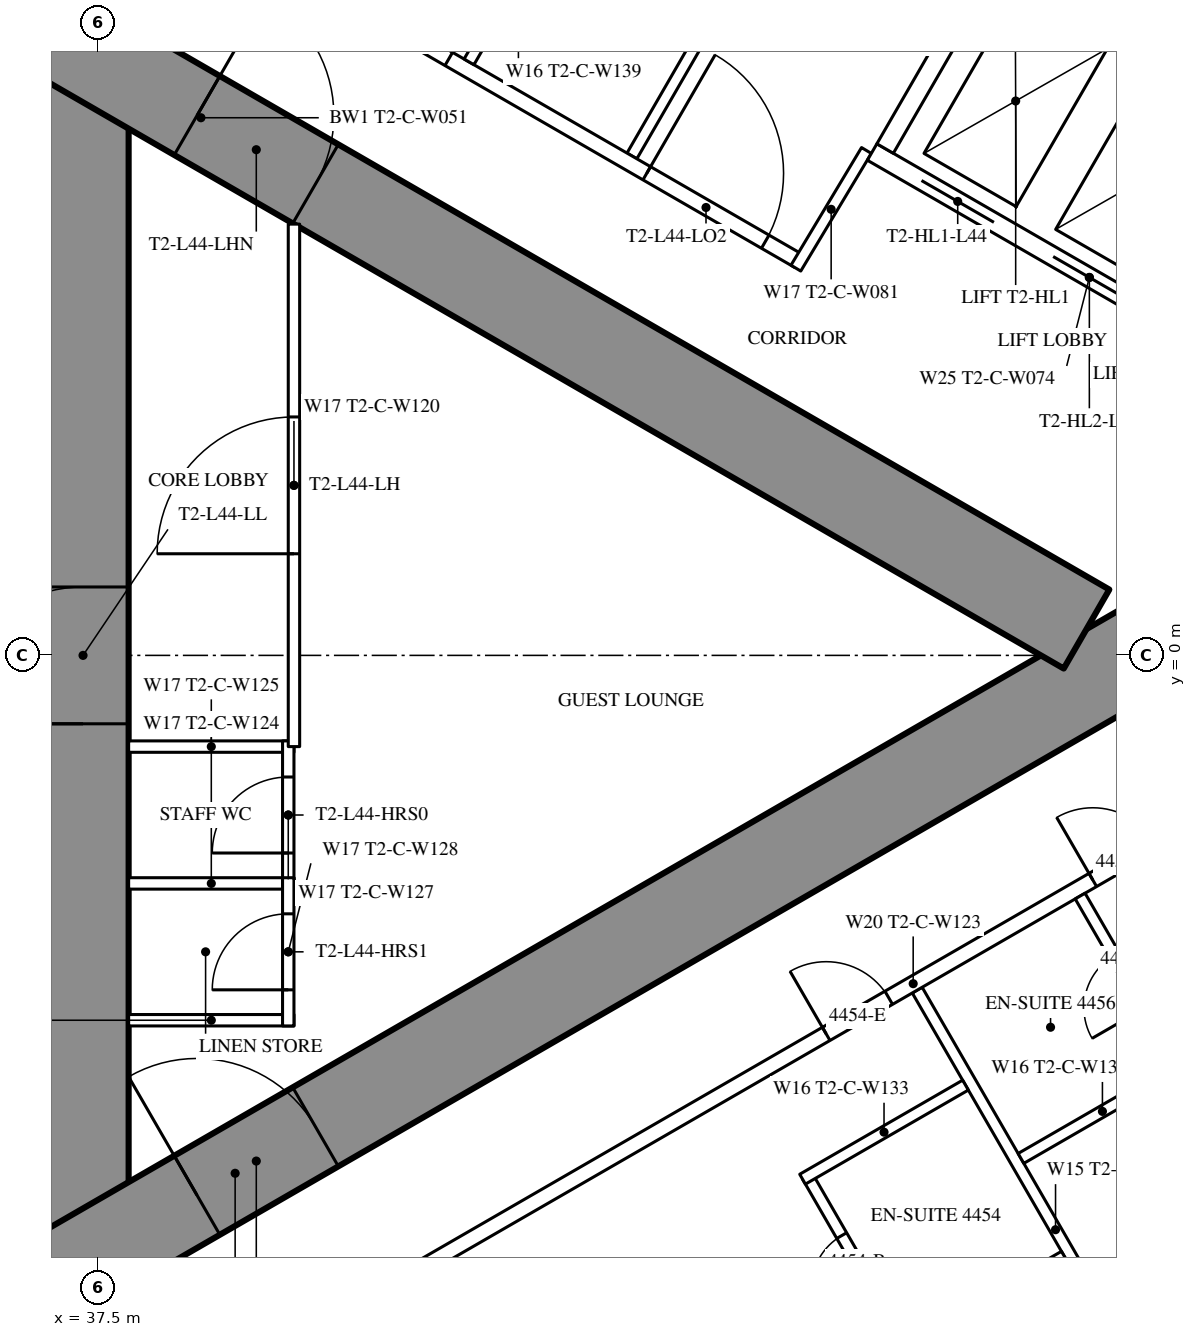
"""IFC4 building model, lengths in metres.
Left out: names, types, materials, properties, quantities, classifications, styles, units other than length and angle.
Written with IfcOpenShell. Run it as: python <this file> out.ifc"""

import sys

from ifc_helpers import new_model, si_unit, direction, frame, frame_2d, origin, place, context, subcontext, project, spatial, rectangle, extrude, element, fill, save


model = new_model("IFC4")
c1 = context("Model", 3, precision=1e-05, world=origin(), true_north=direction((0.0, 1.0)))
c2 = subcontext(c1, "Body", "Model", "MODEL_VIEW")
j1 = project(units=[si_unit("LENGTHUNIT", "METRE"), si_unit("PLANEANGLEUNIT", "RADIAN")], contexts=[c1])
p1 = place(None, origin())
s1 = spatial("IfcSite", under=j1, at=p1, CompositionType="ELEMENT")
p2 = place(p1, origin())
s2 = spatial("IfcBuilding", under=s1, at=p2, CompositionType="ELEMENT")
p3 = place(p2, frame((0.0, 0.0, 166.8)))
s3 = spatial("IfcBuildingStorey", under=s2, at=p3, CompositionType="ELEMENT", Elevation=166.8)
p4 = place(p3, frame((37.3, -8.6, 0.0), z_axis=(0.0, 0.0, 1.0), x_axis=(0.0, 1.0, 0.0)))
e1 = element("IfcWall", 1, at=p4, inside=s3, PredefinedType="SHEAR", context=c2, shape_type="SweptSolid", body=[
    extrude(rectangle(XDim=17.2, YDim=1.2, at=frame_2d((8.6, 0.0))), origin(), (0.0, 0.0, 1.0), 3.5),
])
p5 = place(p4, frame((7.7, 0.0, 0.0)))
e2 = element("IfcOpeningElement", 2, at=p5, cuts=e1, PredefinedType="OPENING", context=c2, shape_type="SweptSolid", body=[
    extrude(rectangle(XDim=1.8, YDim=2.2, at=frame_2d((0.9, 1.1))), frame((0.0, 0.61, 0.0), z_axis=(0.0, -1.0, 0.0), x_axis=(1.0, 0.0, 0.0)), (0.0, 0.0, 1.0), 1.22),
])
p6 = place(p3, frame((27.2, -13.8, 0.0), z_axis=(0.0, 0.0, 1.0), x_axis=(0.866027159892, 0.499996958321, 0.0)))
e3 = element("IfcWall", 3, at=p6, inside=s3, PredefinedType="SHEAR", context=c2, shape_type="SweptSolid", body=[
    extrude(rectangle(XDim=27.947, YDim=1.2, at=frame_2d((13.973, 0.0))), origin(), (0.0, 0.0, 1.0), 3.5),
])
p7 = place(p6, frame((4.6, 0.0, 0.0)))
e4 = element("IfcOpeningElement", 4, at=p7, cuts=e3, PredefinedType="OPENING", context=c2, shape_type="SweptSolid", body=[
    extrude(rectangle(XDim=1.0, YDim=2.2, at=frame_2d((0.5, 1.1))), frame((0.0, 0.61, 0.0), z_axis=(0.0, -1.0, 0.0), x_axis=(1.0, 0.0, 0.0)), (0.0, 0.0, 1.0), 1.22),
])
p8 = place(p6, frame((13.395, 0.0, 0.0)))
e5 = element("IfcOpeningElement", 5, at=p8, cuts=e3, PredefinedType="OPENING", context=c2, shape_type="SweptSolid", body=[
    extrude(rectangle(XDim=1.8, YDim=2.2, at=frame_2d((0.9, 1.1))), frame((0.0, 0.61, 0.0), z_axis=(0.0, -1.0, 0.0), x_axis=(1.0, 0.0, 0.0)), (0.0, 0.0, 1.0), 1.22),
])
p9 = place(p3, frame((27.2, 13.8, 0.0), z_axis=(0.0, 0.0, 1.0), x_axis=(0.866024515034, -0.500001539357, 0.0)))
e6 = element("IfcWall", 6, at=p9, inside=s3, PredefinedType="SHEAR", context=c2, shape_type="SweptSolid", body=[
    extrude(rectangle(XDim=26.907, YDim=1.2, at=frame_2d((13.454, 0.0))), origin(), (0.0, 0.0, 1.0), 3.5),
])
p10 = place(p9, frame((4.6, 0.0, 0.0)))
e7 = element("IfcOpeningElement", 7, at=p10, cuts=e6, PredefinedType="OPENING", context=c2, shape_type="SweptSolid", body=[
    extrude(rectangle(XDim=1.0, YDim=2.2, at=frame_2d((0.5, 1.1))), frame((0.0, 0.61, 0.0), z_axis=(0.0, -1.0, 0.0), x_axis=(1.0, 0.0, 0.0)), (0.0, 0.0, 1.0), 1.22),
])
p11 = place(p9, frame((13.395, 0.0, 0.0)))
e8 = element("IfcOpeningElement", 8, at=p11, cuts=e6, PredefinedType="OPENING", context=c2, shape_type="SweptSolid", body=[
    extrude(rectangle(XDim=1.8, YDim=2.2, at=frame_2d((0.9, 1.1))), frame((0.0, 0.61, 0.0), z_axis=(0.0, -1.0, 0.0), x_axis=(1.0, 0.0, 0.0)), (0.0, 0.0, 1.0), 1.22),
])
p12 = place(p3, frame((48.275, -4.404, 0.0), z_axis=(0.0, 0.0, 1.0), x_axis=(0.500006004368, -0.866021937133, 0.0)))
e9 = element("IfcWall", 9, at=p12, inside=s3, PredefinedType="PARTITIONING", context=c2, shape_type="SweptSolid", body=[
    extrude(rectangle(XDim=7.279, YDim=0.15, at=frame_2d((3.64, 0.0))), origin(), (0.0, 0.0, 1.0), 2.3),
])
p13 = place(p3, frame((44.521, 6.571, 0.0), z_axis=(0.0, 0.0, 1.0), x_axis=(0.500020376429, 0.866013639128, 0.0)))
e10 = element("IfcWall", 10, at=p13, inside=s3, PredefinedType="PARTITIONING", context=c2, shape_type="SweptSolid", body=[
    extrude(rectangle(XDim=7.306, YDim=0.15, at=frame_2d((3.653, 0.0))), origin(), (0.0, 0.0, 1.0), 2.3),
])
p14 = place(p3, frame((27.959, 16.017, 0.0), z_axis=(0.0, 0.0, 1.0), x_axis=(0.866027146794, -0.499996981007, 0.0)))
e11 = element("IfcWall", 11, at=p14, inside=s3, PredefinedType="PARTITIONING", context=c2, shape_type="SweptSolid", body=[
    extrude(rectangle(XDim=21.657, YDim=0.2, at=frame_2d((10.829, 0.0))), origin(), (0.0, 0.0, 1.0), 3.25),
])
p15 = place(p14, frame((15.391, 0.0, 0.0)))
e12 = element("IfcOpeningElement", 12, at=p15, cuts=e11, PredefinedType="OPENING", context=c2, shape_type="SweptSolid", body=[
    extrude(rectangle(XDim=0.95, YDim=2.2, at=frame_2d((0.475, 1.1))), frame((0.0, 0.11, 0.0), z_axis=(0.0, -1.0, 0.0), x_axis=(1.0, 0.0, 0.0)), (0.0, 0.0, 1.0), 0.22),
])
p16 = place(p14, frame((13.409, 0.0, 0.0)))
e13 = element("IfcOpeningElement", 13, at=p16, cuts=e11, PredefinedType="OPENING", context=c2, shape_type="SweptSolid", body=[
    extrude(rectangle(XDim=0.95, YDim=2.2, at=frame_2d((0.475, 1.1))), frame((0.0, 0.11, 0.0), z_axis=(0.0, -1.0, 0.0), x_axis=(1.0, 0.0, 0.0)), (0.0, 0.0, 1.0), 0.22),
])
p17 = place(p14, frame((0.6, 0.0, 0.0)))
e14 = element("IfcOpeningElement", 14, at=p17, cuts=e11, PredefinedType="OPENING", context=c2, shape_type="SweptSolid", body=[
    extrude(rectangle(XDim=0.95, YDim=2.2, at=frame_2d((0.475, 1.1))), frame((0.0, 0.11, 0.0), z_axis=(0.0, -1.0, 0.0), x_axis=(1.0, 0.0, 0.0)), (0.0, 0.0, 1.0), 0.22),
])
p18 = place(p14, frame((19.349, 0.0, 0.0)))
e15 = element("IfcOpeningElement", 15, at=p18, cuts=e11, PredefinedType="OPENING", context=c2, shape_type="SweptSolid", body=[
    extrude(rectangle(XDim=1.8, YDim=2.2, at=frame_2d((0.9, 1.1))), frame((0.0, 0.11, 0.0), z_axis=(0.0, -1.0, 0.0), x_axis=(1.0, 0.0, 0.0)), (0.0, 0.0, 1.0), 0.22),
])
p19 = place(p3, frame((47.606, 6.643, 0.0), z_axis=(0.0, 0.0, 1.0), x_axis=(-0.514237157483, -0.857648031458, 0.0)))
e16 = element("IfcWall", 16, at=p19, inside=s3, PredefinedType="PARTITIONING", context=c2, shape_type="SweptSolid", body=[
    extrude(rectangle(XDim=1.805, YDim=0.15, at=frame_2d((0.902, 0.0))), origin(), (0.0, 0.0, 1.0), 3.25),
])
p20 = place(p3, frame((40.741, -8.638, 0.0), z_axis=(0.0, 0.0, 1.0), x_axis=(0.866022967338, 0.500004220025, 0.0)))
e17 = element("IfcWall", 17, at=p20, inside=s3, PredefinedType="PARTITIONING", context=c2, shape_type="SweptSolid", body=[
    extrude(rectangle(XDim=17.276, YDim=0.2, at=frame_2d((8.638, 0.0))), origin(), (0.0, 0.0, 1.0), 3.25),
])
p21 = place(p20, frame((7.316, 0.0, 0.0)))
e18 = element("IfcOpeningElement", 18, at=p21, cuts=e17, PredefinedType="OPENING", context=c2, shape_type="SweptSolid", body=[
    extrude(rectangle(XDim=0.95, YDim=2.2, at=frame_2d((0.475, 1.1))), frame((0.0, 0.11, 0.0), z_axis=(0.0, -1.0, 0.0), x_axis=(1.0, 0.0, 0.0)), (0.0, 0.0, 1.0), 0.22),
])
p22 = place(p20, frame((11.366, 0.0, 0.0)))
e19 = element("IfcOpeningElement", 19, at=p22, cuts=e17, PredefinedType="OPENING", context=c2, shape_type="SweptSolid", body=[
    extrude(rectangle(XDim=0.95, YDim=2.2, at=frame_2d((0.475, 1.1))), frame((0.0, 0.11, 0.0), z_axis=(0.0, -1.0, 0.0), x_axis=(1.0, 0.0, 0.0)), (0.0, 0.0, 1.0), 0.22),
])
p23 = place(p20, frame((13.347, 0.0, 0.0)))
e20 = element("IfcOpeningElement", 20, at=p23, cuts=e17, PredefinedType="OPENING", context=c2, shape_type="SweptSolid", body=[
    extrude(rectangle(XDim=0.95, YDim=2.2, at=frame_2d((0.475, 1.1))), frame((0.0, 0.11, 0.0), z_axis=(0.0, -1.0, 0.0), x_axis=(1.0, 0.0, 0.0)), (0.0, 0.0, 1.0), 0.22),
])
p24 = place(p3, frame((48.066, -9.143, 0.0), z_axis=(0.0, 0.0, 1.0), x_axis=(0.866006523861, 0.500032699561, 0.0)))
e21 = element("IfcWall", 21, at=p24, inside=s3, PredefinedType="PARTITIONING", context=c2, shape_type="SweptSolid", body=[
    extrude(rectangle(XDim=2.475, YDim=0.15, at=frame_2d((1.237, 0.0))), origin(), (0.0, 0.0, 1.0), 3.25),
])
p25 = place(p3, frame((46.831, -6.854, 0.0), z_axis=(0.0, 0.0, 1.0), x_axis=(0.500006934395, -0.866021400173, 0.0)))
e22 = element("IfcWall", 22, at=p25, inside=s3, PredefinedType="PARTITIONING", context=c2, shape_type="SweptSolid", body=[
    extrude(rectangle(XDim=2.6, YDim=0.15, at=frame_2d((1.3, 0.0))), origin(), (0.0, 0.0, 1.0), 3.25),
])
p26 = place(p25, frame((0.9, 0.0, 0.0)))
e23 = element("IfcOpeningElement", 23, at=p26, cuts=e22, PredefinedType="OPENING", context=c2, shape_type="SweptSolid", body=[
    extrude(rectangle(XDim=0.8, YDim=2.2, at=frame_2d((0.4, 1.1))), frame((0.0, 0.085, 0.0), z_axis=(0.0, -1.0, 0.0), x_axis=(1.0, 0.0, 0.0)), (0.0, 0.0, 1.0), 0.17),
])
for number, where, z_axis, x_axis in (
    (24, (46.766, -6.891, 0.0), (0.0, 0.0, 1.0), (0.866, 0.5, 0.0)),
    (25, (49.64, -6.618, 0.0), (0.0, 0.0, 1.0), (0.866, 0.5, 0.0)),
):
    element("IfcWall", number, at=place(p3, frame(where, z_axis=z_axis, x_axis=x_axis)), inside=s3, PredefinedType="PARTITIONING", context=c2, shape_type="SweptSolid", body=[
        extrude(rectangle(XDim=2.475, YDim=0.15, at=frame_2d((1.237, 0.0))), origin(), (0.0, 0.0, 1.0), 3.25),
    ])
p27 = place(p3, frame((50.418, -3.166, 0.0), z_axis=(0.0, 0.0, 1.0), x_axis=(0.499936506574, -0.866062058628, 0.0)))
e26 = element("IfcWall", 26, at=p27, inside=s3, PredefinedType="PARTITIONING", context=c2, shape_type="SweptSolid", body=[
    extrude(rectangle(XDim=2.6, YDim=0.15, at=frame_2d((1.3, 0.0))), origin(), (0.0, 0.0, 1.0), 3.25),
])
p28 = place(p27, frame((0.9, 0.0, 0.0)))
e27 = element("IfcOpeningElement", 27, at=p28, cuts=e26, PredefinedType="OPENING", context=c2, shape_type="SweptSolid", body=[
    extrude(rectangle(XDim=0.8, YDim=2.2, at=frame_2d((0.4, 1.1))), frame((0.0, 0.085, 0.0), z_axis=(0.0, -1.0, 0.0), x_axis=(1.0, 0.0, 0.0)), (0.0, 0.0, 1.0), 0.17),
])
p29 = place(p3, frame((42.378, 7.808, 0.0), z_axis=(0.0, 0.0, 1.0), x_axis=(0.500006934395, 0.866021400173, 0.0)))
e28 = element("IfcWall", 28, at=p29, inside=s3, PredefinedType="PARTITIONING", context=c2, shape_type="SweptSolid", body=[
    extrude(rectangle(XDim=2.6, YDim=0.15, at=frame_2d((1.3, 0.0))), origin(), (0.0, 0.0, 1.0), 3.25),
])
p30 = place(p29, frame((0.9, 0.0, 0.0)))
e29 = element("IfcOpeningElement", 29, at=p30, cuts=e28, PredefinedType="OPENING", context=c2, shape_type="SweptSolid", body=[
    extrude(rectangle(XDim=0.8, YDim=2.2, at=frame_2d((0.4, 1.1))), frame((0.0, 0.085, 0.0), z_axis=(0.0, -1.0, 0.0), x_axis=(1.0, 0.0, 0.0)), (0.0, 0.0, 1.0), 0.17),
])
for number, where, z_axis, x_axis in (
    (30, (37.9, -1.2, 0.0), (0.0, 0.0, 1.0), (1.0, 0.0, 0.0)),
    (31, (37.9, -3.0, 0.0), (0.0, 0.0, 1.0), (1.0, 0.0, 0.0)),
    (32, (37.9, -4.8, 0.0), (0.0, 0.0, 1.0), (1.0, 0.0, 0.0)),
):
    element("IfcWall", number, at=place(p3, frame(where, z_axis=z_axis, x_axis=x_axis)), inside=s3, PredefinedType="PARTITIONING", context=c2, shape_type="SweptSolid", body=[
        extrude(rectangle(XDim=2.175, YDim=0.15, at=frame_2d((1.087, 0.0))), origin(), (0.0, 0.0, 1.0), 3.25),
    ])
p31 = place(p3, frame((40.0, -3.075, 0.0), z_axis=(0.0, 0.0, 1.0), x_axis=(0.0, 1.0, 0.0)))
e33 = element("IfcWall", 33, at=p31, inside=s3, PredefinedType="PARTITIONING", context=c2, shape_type="SweptSolid", body=[
    extrude(rectangle(XDim=1.95, YDim=0.15, at=frame_2d((0.975, 0.0))), origin(), (0.0, 0.0, 1.0), 3.25),
])
p32 = place(p31, frame((0.475, 0.0, 0.0)))
e34 = element("IfcOpeningElement", 34, at=p32, cuts=e33, PredefinedType="OPENING", context=c2, shape_type="SweptSolid", body=[
    extrude(rectangle(XDim=1.0, YDim=2.2, at=frame_2d((0.5, 1.1))), frame((0.0, 0.085, 0.0), z_axis=(0.0, -1.0, 0.0), x_axis=(1.0, 0.0, 0.0)), (0.0, 0.0, 1.0), 0.17),
])
p33 = place(p3, frame((40.0, -4.875, 0.0), z_axis=(0.0, 0.0, 1.0), x_axis=(0.0, 1.0, 0.0)))
e35 = element("IfcWall", 35, at=p33, inside=s3, PredefinedType="PARTITIONING", context=c2, shape_type="SweptSolid", body=[
    extrude(rectangle(XDim=1.95, YDim=0.15, at=frame_2d((0.975, 0.0))), origin(), (0.0, 0.0, 1.0), 3.25),
])
p34 = place(p33, frame((0.475, 0.0, 0.0)))
e36 = element("IfcOpeningElement", 36, at=p34, cuts=e35, PredefinedType="OPENING", context=c2, shape_type="SweptSolid", body=[
    extrude(rectangle(XDim=1.0, YDim=2.2, at=frame_2d((0.5, 1.1))), frame((0.0, 0.085, 0.0), z_axis=(0.0, -1.0, 0.0), x_axis=(1.0, 0.0, 0.0)), (0.0, 0.0, 1.0), 0.17),
])
p35 = place(p3, frame((40.075, -1.2, 0.0), z_axis=(0.0, 0.0, 1.0), x_axis=(0.0, 1.0, 0.0)))
e37 = element("IfcWall", 37, at=p35, inside=s3, PredefinedType="PARTITIONING", context=c2, shape_type="SweptSolid", body=[
    extrude(rectangle(XDim=6.874, YDim=0.15, at=frame_2d((3.437, 0.0))), origin(), (0.0, 0.0, 1.0), 3.25),
])
p36 = place(p35, frame((2.537, 0.0, 0.0)))
e38 = element("IfcOpeningElement", 38, at=p36, cuts=e37, PredefinedType="OPENING", context=c2, shape_type="SweptSolid", body=[
    extrude(rectangle(XDim=1.8, YDim=2.2, at=frame_2d((0.9, 1.1))), frame((0.0, 0.085, 0.0), z_axis=(0.0, -1.0, 0.0), x_axis=(1.0, 0.0, 0.0)), (0.0, 0.0, 1.0), 0.17),
])
p37 = place(p3, frame((47.681, 6.622, 0.0), z_axis=(0.0, 0.0, 1.0), x_axis=(0.86603344179, -0.499986077507, 0.0)))
e39 = element("IfcWall", 39, at=p37, inside=s3, PredefinedType="PARTITIONING", context=c2, shape_type="SweptSolid", body=[
    extrude(rectangle(XDim=6.6, YDim=0.25, at=frame_2d((3.3, 0.0))), origin(), (0.0, 0.0, 1.0), 3.25),
])
p38 = place(p37, frame((0.75, 0.0, 0.0)))
e40 = element("IfcOpeningElement", 40, at=p38, cuts=e39, PredefinedType="OPENING", context=c2, shape_type="SweptSolid", body=[
    extrude(rectangle(XDim=1.1, YDim=2.2, at=frame_2d((0.55, 1.1))), frame((0.0, 0.135, 0.0), z_axis=(0.0, -1.0, 0.0), x_axis=(1.0, 0.0, 0.0)), (0.0, 0.0, 1.0), 0.27),
])
p39 = place(p37, frame((2.75, 0.0, 0.0)))
e41 = element("IfcOpeningElement", 41, at=p39, cuts=e39, PredefinedType="OPENING", context=c2, shape_type="SweptSolid", body=[
    extrude(rectangle(XDim=1.1, YDim=2.2, at=frame_2d((0.55, 1.1))), frame((0.0, 0.135, 0.0), z_axis=(0.0, -1.0, 0.0), x_axis=(1.0, 0.0, 0.0)), (0.0, 0.0, 1.0), 0.27),
])
p40 = place(p37, frame((4.75, 0.0, 0.0)))
e42 = element("IfcOpeningElement", 42, at=p40, cuts=e39, PredefinedType="OPENING", context=c2, shape_type="SweptSolid", body=[
    extrude(rectangle(XDim=1.1, YDim=2.2, at=frame_2d((0.55, 1.1))), frame((0.0, 0.135, 0.0), z_axis=(0.0, -1.0, 0.0), x_axis=(1.0, 0.0, 0.0)), (0.0, 0.0, 1.0), 0.27),
])
p41 = place(p3, frame((49.406, 9.611, 0.0), z_axis=(0.0, 0.0, 1.0), x_axis=(0.86603344179, -0.499986077507, 0.0)))
e43 = element("IfcWall", 43, at=p41, inside=s3, PredefinedType="PARTITIONING", context=c2, shape_type="SweptSolid", body=[
    extrude(rectangle(XDim=6.6, YDim=0.25, at=frame_2d((3.3, 0.0))), origin(), (0.0, 0.0, 1.0), 3.25),
])
p42 = place(p3, frame((47.852, 6.668, 0.0), z_axis=(0.0, 0.0, 1.0), x_axis=(0.499929347863, 0.866066190972, 0.0)))
e44 = element("IfcWall", 44, at=p42, inside=s3, PredefinedType="PARTITIONING", context=c2, shape_type="SweptSolid", body=[
    extrude(rectangle(XDim=3.201, YDim=0.25, at=frame_2d((1.6, 0.0))), origin(), (0.0, 0.0, 1.0), 3.25),
])
p43 = place(p26, origin())
e45 = element("IfcDoor", 45, at=p43, inside=s3, OperationType="SINGLE_SWING_RIGHT", PredefinedType="DOOR", context=c2, shape_type="SweptSolid", body=[
    extrude(rectangle(XDim=0.8, YDim=2.2, at=frame_2d((0.4, 1.1))), frame((0.0, 0.025, 0.0), z_axis=(0.0, -1.0, 0.0), x_axis=(1.0, 0.0, 0.0)), (0.0, 0.0, 1.0), 0.05),
])
fill(e23, e45)
p44 = place(p21, origin())
e46 = element("IfcDoor", 46, at=p44, inside=s3, OperationType="SINGLE_SWING_LEFT", PredefinedType="DOOR", context=c2, shape_type="SweptSolid", body=[
    extrude(rectangle(XDim=0.95, YDim=2.2, at=frame_2d((0.475, 1.1))), frame((0.0, 0.025, 0.0), z_axis=(0.0, -1.0, 0.0), x_axis=(1.0, 0.0, 0.0)), (0.0, 0.0, 1.0), 0.05),
])
fill(e18, e46)
p45 = place(p28, origin())
e47 = element("IfcDoor", 47, at=p45, inside=s3, OperationType="SINGLE_SWING_RIGHT", PredefinedType="DOOR", context=c2, shape_type="SweptSolid", body=[
    extrude(rectangle(XDim=0.8, YDim=2.2, at=frame_2d((0.4, 1.1))), frame((0.0, 0.025, 0.0), z_axis=(0.0, -1.0, 0.0), x_axis=(1.0, 0.0, 0.0)), (0.0, 0.0, 1.0), 0.05),
])
fill(e27, e47)
p46 = place(p22, origin())
e48 = element("IfcDoor", 48, at=p46, inside=s3, OperationType="SINGLE_SWING_LEFT", PredefinedType="DOOR", context=c2, shape_type="SweptSolid", body=[
    extrude(rectangle(XDim=0.95, YDim=2.2, at=frame_2d((0.475, 1.1))), frame((0.0, 0.025, 0.0), z_axis=(0.0, -1.0, 0.0), x_axis=(1.0, 0.0, 0.0)), (0.0, 0.0, 1.0), 0.05),
])
fill(e19, e48)
p47 = place(p15, origin())
e49 = element("IfcDoor", 49, at=p47, inside=s3, OperationType="SINGLE_SWING_LEFT", PredefinedType="DOOR", context=c2, shape_type="SweptSolid", body=[
    extrude(rectangle(XDim=0.95, YDim=2.2, at=frame_2d((0.475, 1.1))), frame((0.0, 0.025, 0.0), z_axis=(0.0, -1.0, 0.0), x_axis=(1.0, 0.0, 0.0)), (0.0, 0.0, 1.0), 0.05),
])
fill(e12, e49)
p48 = place(p18, origin())
e50 = element("IfcDoor", 50, at=p48, inside=s3, OperationType="DOUBLE_DOOR_SINGLE_SWING", PredefinedType="DOOR", context=c2, shape_type="SweptSolid", body=[
    extrude(rectangle(XDim=1.8, YDim=2.2, at=frame_2d((0.9, 1.1))), frame((0.0, 0.025, 0.0), z_axis=(0.0, -1.0, 0.0), x_axis=(1.0, 0.0, 0.0)), (0.0, 0.0, 1.0), 0.05),
])
fill(e15, e50)
p49 = place(p32, origin())
e51 = element("IfcDoor", 51, at=p49, inside=s3, OperationType="SINGLE_SWING_LEFT", PredefinedType="DOOR", context=c2, shape_type="SweptSolid", body=[
    extrude(rectangle(XDim=1.0, YDim=2.2, at=frame_2d((0.5, 1.1))), frame((0.0, 0.025, 0.0), z_axis=(0.0, -1.0, 0.0), x_axis=(1.0, 0.0, 0.0)), (0.0, 0.0, 1.0), 0.05),
])
fill(e34, e51)
p50 = place(p34, origin())
e52 = element("IfcDoor", 52, at=p50, inside=s3, OperationType="SINGLE_SWING_LEFT", PredefinedType="DOOR", context=c2, shape_type="SweptSolid", body=[
    extrude(rectangle(XDim=1.0, YDim=2.2, at=frame_2d((0.5, 1.1))), frame((0.0, 0.025, 0.0), z_axis=(0.0, -1.0, 0.0), x_axis=(1.0, 0.0, 0.0)), (0.0, 0.0, 1.0), 0.05),
])
fill(e36, e52)
p51 = place(p36, origin())
e53 = element("IfcDoor", 53, at=p51, inside=s3, OperationType="DOUBLE_DOOR_SINGLE_SWING", PredefinedType="DOOR", context=c2, shape_type="SweptSolid", body=[
    extrude(rectangle(XDim=1.8, YDim=2.2, at=frame_2d((0.9, 1.1))), frame((0.0, 0.025, 0.0), z_axis=(0.0, -1.0, 0.0), x_axis=(1.0, 0.0, 0.0)), (0.0, 0.0, 1.0), 0.05),
])
fill(e38, e53)
p52 = place(p8, origin())
e54 = element("IfcDoor", 54, at=p52, inside=s3, OperationType="DOUBLE_DOOR_SINGLE_SWING", PredefinedType="DOOR", context=c2, shape_type="SweptSolid", body=[
    extrude(rectangle(XDim=1.8, YDim=2.2, at=frame_2d((0.9, 1.1))), frame((0.0, 0.025, 0.0), z_axis=(0.0, -1.0, 0.0), x_axis=(1.0, 0.0, 0.0)), (0.0, 0.0, 1.0), 0.05),
])
fill(e5, e54)
p53 = place(p11, origin())
e55 = element("IfcDoor", 55, at=p53, inside=s3, OperationType="DOUBLE_DOOR_SINGLE_SWING", PredefinedType="DOOR", context=c2, shape_type="SweptSolid", body=[
    extrude(rectangle(XDim=1.8, YDim=2.2, at=frame_2d((0.9, 1.1))), frame((0.0, 0.025, 0.0), z_axis=(0.0, -1.0, 0.0), x_axis=(1.0, 0.0, 0.0)), (0.0, 0.0, 1.0), 0.05),
])
fill(e8, e55)
p54 = place(p5, origin())
e56 = element("IfcDoor", 56, at=p54, inside=s3, OperationType="DOUBLE_DOOR_SINGLE_SWING", PredefinedType="DOOR", context=c2, shape_type="SweptSolid", body=[
    extrude(rectangle(XDim=1.8, YDim=2.2, at=frame_2d((0.9, 1.1))), frame((0.0, 0.025, 0.0), z_axis=(0.0, -1.0, 0.0), x_axis=(1.0, 0.0, 0.0)), (0.0, 0.0, 1.0), 0.05),
])
fill(e2, e56)
p55 = place(p38, origin())
e57 = element("IfcDoor", 57, at=p55, inside=s3, OperationType="DOUBLE_DOOR_SLIDING", PredefinedType="USERDEFINED", context=c2, shape_type="SweptSolid", body=[
    extrude(rectangle(XDim=1.1, YDim=2.2, at=frame_2d((0.55, 1.1))), frame((0.0, 0.025, 0.0), z_axis=(0.0, -1.0, 0.0), x_axis=(1.0, 0.0, 0.0)), (0.0, 0.0, 1.0), 0.05),
])
fill(e40, e57)
p56 = place(p39, origin())
e58 = element("IfcDoor", 58, at=p56, inside=s3, OperationType="DOUBLE_DOOR_SLIDING", PredefinedType="USERDEFINED", context=c2, shape_type="SweptSolid", body=[
    extrude(rectangle(XDim=1.1, YDim=2.2, at=frame_2d((0.55, 1.1))), frame((0.0, 0.025, 0.0), z_axis=(0.0, -1.0, 0.0), x_axis=(1.0, 0.0, 0.0)), (0.0, 0.0, 1.0), 0.05),
])
fill(e41, e58)
save(model, sys.argv[1])
